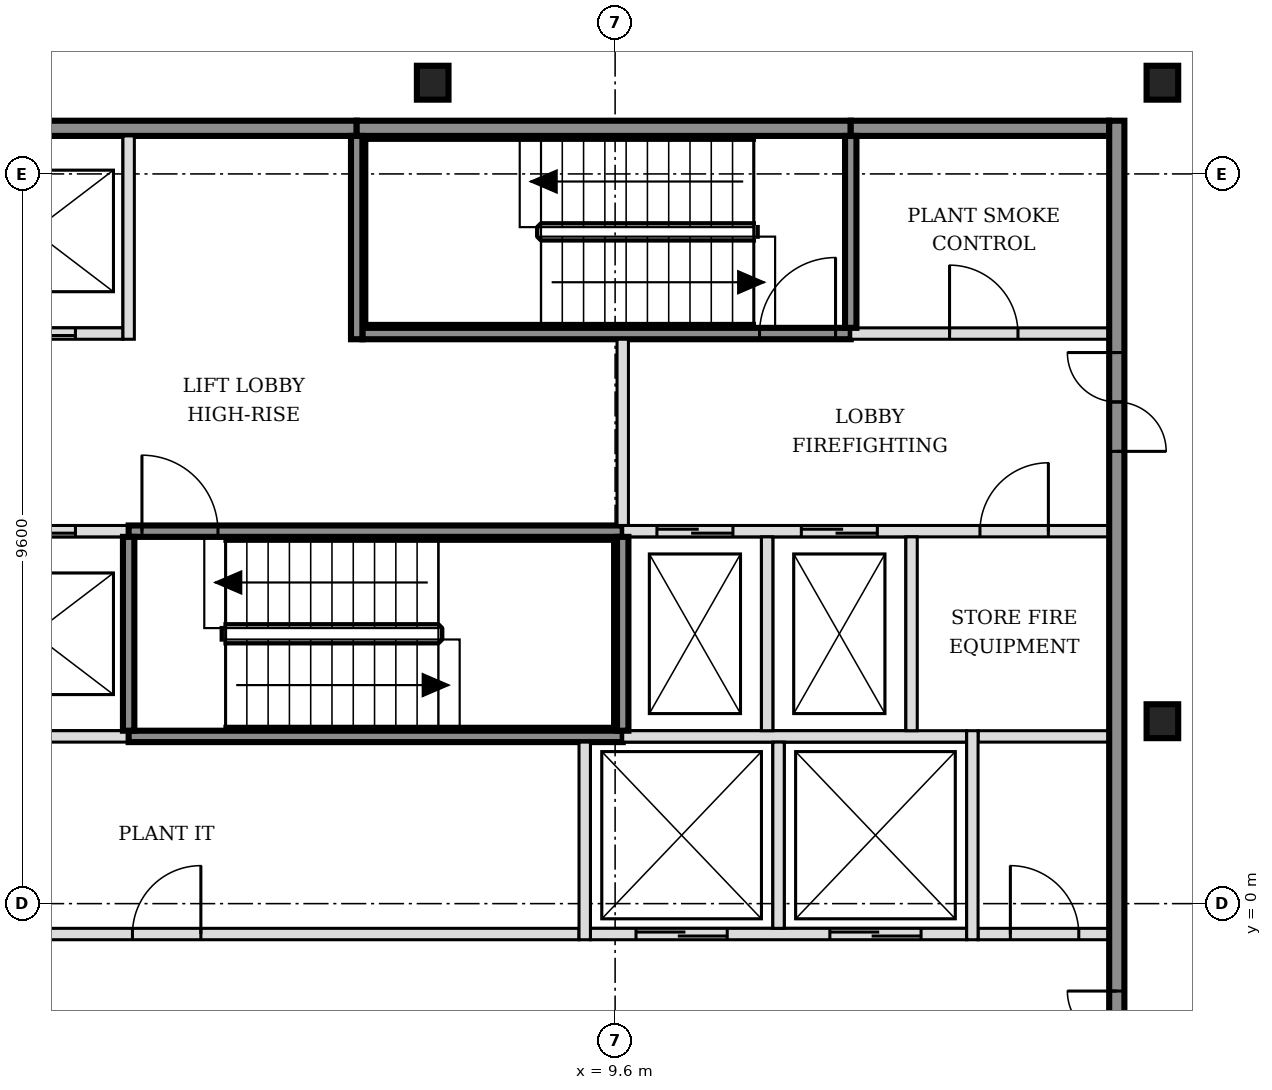
"""IFC4 building model, lengths in metres.
Left out: names, types, materials, properties, quantities, classifications, styles, units other than length and angle.
Written with IfcOpenShell. Run it as: python <this file> out.ifc"""

import sys

from ifc_helpers import new_model, si_unit, direction, frame, frame_2d, origin, origin_2d, place, context, subcontext, project, spatial, rectangle, i_section, extrude, element, fill, save


model = new_model("IFC4")
c1 = context("Model", 3, precision=1e-05, world=origin(), true_north=direction((0.0, 1.0)))
c2 = subcontext(c1, "Body", "Model", "MODEL_VIEW")
j1 = project(units=[si_unit("LENGTHUNIT", "METRE"), si_unit("PLANEANGLEUNIT", "RADIAN")], contexts=[c1])
p1 = place(None, origin())
s1 = spatial("IfcSite", under=j1, at=p1, CompositionType="ELEMENT")
p2 = place(p1, origin())
s2 = spatial("IfcBuilding", under=s1, at=p2, CompositionType="ELEMENT")
p3 = place(p2, frame((0.0, 0.0, 172.2)))
s3 = spatial("IfcBuildingStorey", under=s2, at=p3, CompositionType="ELEMENT", Elevation=172.2)
for number, where, z_axis, x_axis in (
    (1, (16.8, 2.4, -0.15), (0.0, 0.0, 1.0), (1.0, 0.0, 0.0)),
    (2, (7.2, 10.8, -0.15), (0.0, 0.0, 1.0), (1.0, 0.0, 0.0)),
    (3, (16.8, 10.8, -0.15), (0.0, 0.0, 1.0), (1.0, 0.0, 0.0)),
):
    element("IfcColumn", number, at=place(p3, frame(where, z_axis=z_axis, x_axis=x_axis)), inside=s3, PredefinedType="COLUMN", context=c2, shape_type="SweptSolid", body=[
        extrude(i_section(OverallWidth=0.416, OverallDepth=0.446, WebThickness=0.039, FlangeThickness=0.063, FilletRadius=0.015, at=origin_2d()), origin(), (0.0, 0.0, 1.0), 3.6),
    ])
p4 = place(p3, frame((-1.7, -0.4, 0.0), z_axis=(0.0, 0.0, 1.0), x_axis=(1.0, 0.0, 0.0)))
e4 = element("IfcWall", 4, at=p4, inside=s3, PredefinedType="PARTITIONING", context=c2, shape_type="SweptSolid", body=[
    extrude(rectangle(XDim=10.825, YDim=0.15, at=frame_2d((5.413, 0.0))), origin(), (0.0, 0.0, 1.0), 3.45),
])
p5 = place(p4, frame((4.95, 0.0, 0.0)))
e5 = element("IfcOpeningElement", 5, at=p5, cuts=e4, PredefinedType="OPENING", context=c2, shape_type="SweptSolid", body=[
    extrude(rectangle(XDim=0.9, YDim=2.1, at=frame_2d((0.45, 1.05))), frame((0.0, 0.085, 0.0), z_axis=(0.0, -1.0, 0.0), x_axis=(1.0, 0.0, 0.0)), (0.0, 0.0, 1.0), 0.17),
])
p6 = place(p3, frame((9.275, -0.4, 0.0), z_axis=(0.0, 0.0, 1.0), x_axis=(1.0, 0.0, 0.0)))
e6 = element("IfcWall", 6, at=p6, inside=s3, PredefinedType="SOLIDWALL", context=c2, shape_type="SweptSolid", body=[
    extrude(rectangle(XDim=4.95, YDim=0.15, at=frame_2d((2.475, 0.0))), origin(), (0.0, 0.0, 1.0), 3.45),
])
p7 = place(p6, frame((0.6, 0.0, 0.0)))
e7 = element("IfcOpeningElement", 7, at=p7, cuts=e6, PredefinedType="OPENING", context=c2, shape_type="SweptSolid", body=[
    extrude(rectangle(XDim=1.2, YDim=2.1, at=frame_2d((0.6, 1.05))), frame((0.0, 0.085, 0.0), z_axis=(0.0, -1.0, 0.0), x_axis=(1.0, 0.0, 0.0)), (0.0, 0.0, 1.0), 0.17),
])
p8 = place(p6, frame((3.15, 0.0, 0.0)))
e8 = element("IfcOpeningElement", 8, at=p8, cuts=e6, PredefinedType="OPENING", context=c2, shape_type="SweptSolid", body=[
    extrude(rectangle(XDim=1.2, YDim=2.1, at=frame_2d((0.6, 1.05))), frame((0.0, 0.085, 0.0), z_axis=(0.0, -1.0, 0.0), x_axis=(1.0, 0.0, 0.0)), (0.0, 0.0, 1.0), 0.17),
])
p9 = place(p3, frame((14.375, -0.4, 0.0), z_axis=(0.0, 0.0, 1.0), x_axis=(1.0, 0.0, 0.0)))
e9 = element("IfcWall", 9, at=p9, inside=s3, PredefinedType="PARTITIONING", context=c2, shape_type="SweptSolid", body=[
    extrude(rectangle(XDim=1.725, YDim=0.15, at=frame_2d((0.863, 0.0))), origin(), (0.0, 0.0, 1.0), 3.45),
])
p10 = place(p9, frame((0.425, 0.0, 0.0)))
e10 = element("IfcOpeningElement", 10, at=p10, cuts=e9, PredefinedType="OPENING", context=c2, shape_type="SweptSolid", body=[
    extrude(rectangle(XDim=0.9, YDim=2.1, at=frame_2d((0.45, 1.05))), frame((0.0, 0.085, 0.0), z_axis=(0.0, -1.0, 0.0), x_axis=(1.0, 0.0, 0.0)), (0.0, 0.0, 1.0), 0.17),
])
p11 = place(p3, frame((-1.7, 2.2, 0.0), z_axis=(0.0, 0.0, 1.0), x_axis=(1.0, 0.0, 0.0)))
e11 = element("IfcWall", 11, at=p11, inside=s3, PredefinedType="SOLIDWALL", context=c2, shape_type="SweptSolid", body=[
    extrude(rectangle(XDim=4.9, YDim=0.15, at=frame_2d((2.45, 0.0))), origin(), (0.0, 0.0, 1.0), 3.45),
])
p12 = place(p3, frame((3.2, 2.2, 0.0), z_axis=(0.0, 0.0, 1.0), x_axis=(1.0, 0.0, 0.0)))
e12 = element("IfcWall", 12, at=p12, inside=s3, PredefinedType="SOLIDWALL", context=c2, shape_type="SweptSolid", body=[
    extrude(rectangle(XDim=6.5, YDim=0.15, at=frame_2d((3.25, 0.0))), origin(), (0.0, 0.0, 1.0), 3.45),
])
p13 = place(p3, frame((9.7, 2.2, 0.0), z_axis=(0.0, 0.0, 1.0), x_axis=(1.0, 0.0, 0.0)))
e13 = element("IfcWall", 13, at=p13, inside=s3, PredefinedType="SOLIDWALL", context=c2, shape_type="SweptSolid", body=[
    extrude(rectangle(XDim=4.525, YDim=0.15, at=frame_2d((2.263, 0.0))), origin(), (0.0, 0.0, 1.0), 3.45),
])
p14 = place(p3, frame((14.375, 2.2, 0.0), z_axis=(0.0, 0.0, 1.0), x_axis=(1.0, 0.0, 0.0)))
e14 = element("IfcWall", 14, at=p14, inside=s3, PredefinedType="PARTITIONING", context=c2, shape_type="SweptSolid", body=[
    extrude(rectangle(XDim=1.725, YDim=0.15, at=frame_2d((0.863, 0.0))), origin(), (0.0, 0.0, 1.0), 3.45),
])
p15 = place(p3, frame((-1.7, 4.9, 0.0), z_axis=(0.0, 0.0, 1.0), x_axis=(1.0, 0.0, 0.0)))
e15 = element("IfcWall", 15, at=p15, inside=s3, PredefinedType="SOLIDWALL", context=c2, shape_type="SweptSolid", body=[
    extrude(rectangle(XDim=4.9, YDim=0.15, at=frame_2d((2.45, 0.0))), origin(), (0.0, 0.0, 1.0), 3.45),
])
p16 = place(p15, frame((0.6, 0.0, 0.0)))
e16 = element("IfcOpeningElement", 16, at=p16, cuts=e15, PredefinedType="OPENING", context=c2, shape_type="SweptSolid", body=[
    extrude(rectangle(XDim=1.1, YDim=2.1, at=frame_2d((0.55, 1.05))), frame((0.0, 0.085, 0.0), z_axis=(0.0, -1.0, 0.0), x_axis=(1.0, 0.0, 0.0)), (0.0, 0.0, 1.0), 0.17),
])
p17 = place(p15, frame((3.1, 0.0, 0.0)))
e17 = element("IfcOpeningElement", 17, at=p17, cuts=e15, PredefinedType="OPENING", context=c2, shape_type="SweptSolid", body=[
    extrude(rectangle(XDim=1.1, YDim=2.1, at=frame_2d((0.55, 1.05))), frame((0.0, 0.085, 0.0), z_axis=(0.0, -1.0, 0.0), x_axis=(1.0, 0.0, 0.0)), (0.0, 0.0, 1.0), 0.17),
])
p18 = place(p3, frame((3.2, 4.9, 0.0), z_axis=(0.0, 0.0, 1.0), x_axis=(1.0, 0.0, 0.0)))
e18 = element("IfcWall", 18, at=p18, inside=s3, PredefinedType="SOLIDWALL", context=c2, shape_type="SweptSolid", body=[
    extrude(rectangle(XDim=6.5, YDim=0.15, at=frame_2d((3.25, 0.0))), origin(), (0.0, 0.0, 1.0), 3.45),
])
p19 = place(p18, frame((0.175, 0.0, 0.0)))
e19 = element("IfcOpeningElement", 19, at=p19, cuts=e18, PredefinedType="OPENING", context=c2, shape_type="SweptSolid", body=[
    extrude(rectangle(XDim=1.0, YDim=2.1, at=frame_2d((0.5, 1.05))), frame((0.0, 0.085, 0.0), z_axis=(0.0, -1.0, 0.0), x_axis=(1.0, 0.0, 0.0)), (0.0, 0.0, 1.0), 0.17),
])
p20 = place(p3, frame((9.7, 4.9, 0.0), z_axis=(0.0, 0.0, 1.0), x_axis=(1.0, 0.0, 0.0)))
e20 = element("IfcWall", 20, at=p20, inside=s3, PredefinedType="SOLIDWALL", context=c2, shape_type="SweptSolid", body=[
    extrude(rectangle(XDim=6.4, YDim=0.15, at=frame_2d((3.2, 0.0))), origin(), (0.0, 0.0, 1.0), 3.45),
])
p21 = place(p20, frame((0.45, 0.0, 0.0)))
e21 = element("IfcOpeningElement", 21, at=p21, cuts=e20, PredefinedType="OPENING", context=c2, shape_type="SweptSolid", body=[
    extrude(rectangle(XDim=1.0, YDim=2.1, at=frame_2d((0.5, 1.05))), frame((0.0, 0.085, 0.0), z_axis=(0.0, -1.0, 0.0), x_axis=(1.0, 0.0, 0.0)), (0.0, 0.0, 1.0), 0.17),
])
p22 = place(p20, frame((2.35, 0.0, 0.0)))
e22 = element("IfcOpeningElement", 22, at=p22, cuts=e20, PredefinedType="OPENING", context=c2, shape_type="SweptSolid", body=[
    extrude(rectangle(XDim=1.0, YDim=2.1, at=frame_2d((0.5, 1.05))), frame((0.0, 0.085, 0.0), z_axis=(0.0, -1.0, 0.0), x_axis=(1.0, 0.0, 0.0)), (0.0, 0.0, 1.0), 0.17),
])
p23 = place(p20, frame((4.7, 0.0, 0.0)))
e23 = element("IfcOpeningElement", 23, at=p23, cuts=e20, PredefinedType="OPENING", context=c2, shape_type="SweptSolid", body=[
    extrude(rectangle(XDim=0.9, YDim=2.1, at=frame_2d((0.45, 1.05))), frame((0.0, 0.085, 0.0), z_axis=(0.0, -1.0, 0.0), x_axis=(1.0, 0.0, 0.0)), (0.0, 0.0, 1.0), 0.17),
])
p24 = place(p3, frame((-1.7, 7.5, 0.0), z_axis=(0.0, 0.0, 1.0), x_axis=(1.0, 0.0, 0.0)))
e24 = element("IfcWall", 24, at=p24, inside=s3, PredefinedType="SOLIDWALL", context=c2, shape_type="SweptSolid", body=[
    extrude(rectangle(XDim=4.825, YDim=0.15, at=frame_2d((2.413, 0.0))), origin(), (0.0, 0.0, 1.0), 3.45),
])
p25 = place(p24, frame((0.6, 0.0, 0.0)))
e25 = element("IfcOpeningElement", 25, at=p25, cuts=e24, PredefinedType="OPENING", context=c2, shape_type="SweptSolid", body=[
    extrude(rectangle(XDim=1.1, YDim=2.1, at=frame_2d((0.55, 1.05))), frame((0.0, 0.085, 0.0), z_axis=(0.0, -1.0, 0.0), x_axis=(1.0, 0.0, 0.0)), (0.0, 0.0, 1.0), 0.17),
])
p26 = place(p24, frame((3.1, 0.0, 0.0)))
e26 = element("IfcOpeningElement", 26, at=p26, cuts=e24, PredefinedType="OPENING", context=c2, shape_type="SweptSolid", body=[
    extrude(rectangle(XDim=1.1, YDim=2.1, at=frame_2d((0.55, 1.05))), frame((0.0, 0.085, 0.0), z_axis=(0.0, -1.0, 0.0), x_axis=(1.0, 0.0, 0.0)), (0.0, 0.0, 1.0), 0.17),
])
p27 = place(p3, frame((6.275, 7.5, 0.0), z_axis=(0.0, 0.0, 1.0), x_axis=(1.0, 0.0, 0.0)))
e27 = element("IfcWall", 27, at=p27, inside=s3, PredefinedType="SOLIDWALL", context=c2, shape_type="SweptSolid", body=[
    extrude(rectangle(XDim=6.425, YDim=0.15, at=frame_2d((3.212, 0.0))), origin(), (0.0, 0.0, 1.0), 3.45),
])
p28 = place(p27, frame((5.225, 0.0, 0.0)))
e28 = element("IfcOpeningElement", 28, at=p28, cuts=e27, PredefinedType="OPENING", context=c2, shape_type="SweptSolid", body=[
    extrude(rectangle(XDim=1.0, YDim=2.1, at=frame_2d((0.5, 1.05))), frame((0.0, 0.085, 0.0), z_axis=(0.0, -1.0, 0.0), x_axis=(1.0, 0.0, 0.0)), (0.0, 0.0, 1.0), 0.17),
])
p29 = place(p3, frame((12.7, 7.5, 0.0), z_axis=(0.0, 0.0, 1.0), x_axis=(1.0, 0.0, 0.0)))
e29 = element("IfcWall", 29, at=p29, inside=s3, PredefinedType="SOLIDWALL", context=c2, shape_type="SweptSolid", body=[
    extrude(rectangle(XDim=3.4, YDim=0.15, at=frame_2d((1.7, 0.0))), origin(), (0.0, 0.0, 1.0), 3.45),
])
p30 = place(p29, frame((1.3, 0.0, 0.0)))
e30 = element("IfcOpeningElement", 30, at=p30, cuts=e29, PredefinedType="OPENING", context=c2, shape_type="SweptSolid", body=[
    extrude(rectangle(XDim=0.9, YDim=2.1, at=frame_2d((0.45, 1.05))), frame((0.0, 0.085, 0.0), z_axis=(0.0, -1.0, 0.0), x_axis=(1.0, 0.0, 0.0)), (0.0, 0.0, 1.0), 0.17),
])
p31 = place(p3, frame((-1.7, 10.2, 0.0), z_axis=(0.0, 0.0, 1.0), x_axis=(1.0, 0.0, 0.0)))
e31 = element("IfcWall", 31, at=p31, inside=s3, PredefinedType="SOLIDWALL", context=c2, shape_type="SweptSolid", body=[
    extrude(rectangle(XDim=7.9, YDim=0.2, at=frame_2d((3.95, 0.0))), origin(), (0.0, 0.0, 1.0), 3.45),
])
p32 = place(p3, frame((6.2, 10.2, 0.0), z_axis=(0.0, 0.0, 1.0), x_axis=(1.0, 0.0, 0.0)))
e32 = element("IfcWall", 32, at=p32, inside=s3, PredefinedType="SOLIDWALL", context=c2, shape_type="SweptSolid", body=[
    extrude(rectangle(XDim=6.5, YDim=0.2, at=frame_2d((3.25, 0.0))), origin(), (0.0, 0.0, 1.0), 3.45),
])
p33 = place(p3, frame((12.7, 10.2, 0.0), z_axis=(0.0, 0.0, 1.0), x_axis=(1.0, 0.0, 0.0)))
e33 = element("IfcWall", 33, at=p33, inside=s3, PredefinedType="SOLIDWALL", context=c2, shape_type="SweptSolid", body=[
    extrude(rectangle(XDim=3.4, YDim=0.2, at=frame_2d((1.7, 0.0))), origin(), (0.0, 0.0, 1.0), 3.45),
])
p34 = place(p3, frame((3.2, 2.275, 0.0), z_axis=(0.0, 0.0, 1.0), x_axis=(0.0, 1.0, 0.0)))
e34 = element("IfcWall", 34, at=p34, inside=s3, PredefinedType="SOLIDWALL", context=c2, shape_type="SweptSolid", body=[
    extrude(rectangle(XDim=2.55, YDim=0.15, at=frame_2d((1.275, 0.0))), origin(), (0.0, 0.0, 1.0), 3.45),
])
for number, where, z_axis, x_axis in (
    (35, (3.2, 7.425, 0.0), (0.0, 0.0, 1.0), (0.0, 1.0, 0.0)),
    (36, (6.2, 7.425, 0.0), (0.0, 0.0, 1.0), (0.0, 1.0, 0.0)),
):
    element("IfcWall", number, at=place(p3, frame(where, z_axis=z_axis, x_axis=x_axis)), inside=s3, PredefinedType="SOLIDWALL", context=c2, shape_type="SweptSolid", body=[
        extrude(rectangle(XDim=2.675, YDim=0.15, at=frame_2d((1.337, 0.0))), origin(), (0.0, 0.0, 1.0), 3.45),
    ])
p35 = place(p3, frame((9.2, -0.475, 0.0), z_axis=(0.0, 0.0, 1.0), x_axis=(0.0, 1.0, 0.0)))
e37 = element("IfcWall", 37, at=p35, inside=s3, PredefinedType="SOLIDWALL", context=c2, shape_type="SweptSolid", body=[
    extrude(rectangle(XDim=2.6, YDim=0.15, at=frame_2d((1.3, 0.0))), origin(), (0.0, 0.0, 1.0), 3.45),
])
p36 = place(p3, frame((9.7, 2.275, 0.0), z_axis=(0.0, 0.0, 1.0), x_axis=(0.0, 1.0, 0.0)))
e38 = element("IfcWall", 38, at=p36, inside=s3, PredefinedType="SOLIDWALL", context=c2, shape_type="SweptSolid", body=[
    extrude(rectangle(XDim=2.55, YDim=0.15, at=frame_2d((1.275, 0.0))), origin(), (0.0, 0.0, 1.0), 3.45),
])
p37 = place(p3, frame((9.7, 4.975, 0.0), z_axis=(0.0, 0.0, 1.0), x_axis=(0.0, 1.0, 0.0)))
e39 = element("IfcWall", 39, at=p37, inside=s3, PredefinedType="SOLIDWALL", context=c2, shape_type="SweptSolid", body=[
    extrude(rectangle(XDim=2.45, YDim=0.15, at=frame_2d((1.225, 0.0))), origin(), (0.0, 0.0, 1.0), 3.45),
])
p38 = place(p3, frame((11.6, 2.275, 0.0), z_axis=(0.0, 0.0, 1.0), x_axis=(0.0, 1.0, 0.0)))
e40 = element("IfcWall", 40, at=p38, inside=s3, PredefinedType="SOLIDWALL", context=c2, shape_type="SweptSolid", body=[
    extrude(rectangle(XDim=2.55, YDim=0.15, at=frame_2d((1.275, 0.0))), origin(), (0.0, 0.0, 1.0), 3.45),
])
p39 = place(p3, frame((11.75, -0.325, 0.0), z_axis=(0.0, 0.0, 1.0), x_axis=(0.0, 1.0, 0.0)))
e41 = element("IfcWall", 41, at=p39, inside=s3, PredefinedType="SOLIDWALL", context=c2, shape_type="SweptSolid", body=[
    extrude(rectangle(XDim=2.45, YDim=0.15, at=frame_2d((1.225, 0.0))), origin(), (0.0, 0.0, 1.0), 3.45),
])
p40 = place(p3, frame((12.7, 7.575, 0.0), z_axis=(0.0, 0.0, 1.0), x_axis=(0.0, 1.0, 0.0)))
e42 = element("IfcWall", 42, at=p40, inside=s3, PredefinedType="SOLIDWALL", context=c2, shape_type="SweptSolid", body=[
    extrude(rectangle(XDim=2.525, YDim=0.15, at=frame_2d((1.263, 0.0))), origin(), (0.0, 0.0, 1.0), 3.45),
])
p41 = place(p3, frame((13.5, 2.275, 0.0), z_axis=(0.0, 0.0, 1.0), x_axis=(0.0, 1.0, 0.0)))
e43 = element("IfcWall", 43, at=p41, inside=s3, PredefinedType="SOLIDWALL", context=c2, shape_type="SweptSolid", body=[
    extrude(rectangle(XDim=2.55, YDim=0.15, at=frame_2d((1.275, 0.0))), origin(), (0.0, 0.0, 1.0), 3.45),
])
p42 = place(p3, frame((14.3, -0.475, 0.0), z_axis=(0.0, 0.0, 1.0), x_axis=(0.0, 1.0, 0.0)))
e44 = element("IfcWall", 44, at=p42, inside=s3, PredefinedType="SOLIDWALL", context=c2, shape_type="SweptSolid", body=[
    extrude(rectangle(XDim=2.75, YDim=0.15, at=frame_2d((1.375, 0.0))), origin(), (0.0, 0.0, 1.0), 3.45),
])
p43 = place(p3, frame((16.2, -5.5, 0.0), z_axis=(0.0, 0.0, 1.0), x_axis=(0.0, 1.0, 0.0)))
e45 = element("IfcWall", 45, at=p43, inside=s3, PredefinedType="SOLIDWALL", context=c2, shape_type="SweptSolid", body=[
    extrude(rectangle(XDim=15.8, YDim=0.2, at=frame_2d((7.9, 0.0))), origin(), (0.0, 0.0, 1.0), 3.45),
])
p44 = place(p43, frame((3.05, 0.0, 0.0)))
e46 = element("IfcOpeningElement", 46, at=p44, cuts=e45, PredefinedType="OPENING", context=c2, shape_type="SweptSolid", body=[
    extrude(rectangle(XDim=1.3, YDim=2.1, at=frame_2d((0.65, 1.05))), frame((0.0, 0.11, 0.0), z_axis=(0.0, -1.0, 0.0), x_axis=(1.0, 0.0, 0.0)), (0.0, 0.0, 1.0), 0.22),
])
p45 = place(p43, frame((11.45, 0.0, 0.0)))
e47 = element("IfcOpeningElement", 47, at=p45, cuts=e45, PredefinedType="OPENING", context=c2, shape_type="SweptSolid", body=[
    extrude(rectangle(XDim=1.3, YDim=2.1, at=frame_2d((0.65, 1.05))), frame((0.0, 0.11, 0.0), z_axis=(0.0, -1.0, 0.0), x_axis=(1.0, 0.0, 0.0)), (0.0, 0.0, 1.0), 0.22),
])
p46 = place(p7, origin())
e48 = element("IfcDoor", 48, at=p46, inside=s3, OperationType="DOUBLE_DOOR_SLIDING", PredefinedType="DOOR", context=c2, shape_type="SweptSolid", body=[
    extrude(rectangle(XDim=1.2, YDim=2.1, at=frame_2d((0.6, 1.05))), frame((0.0, 0.025, 0.0), z_axis=(0.0, -1.0, 0.0), x_axis=(1.0, 0.0, 0.0)), (0.0, 0.0, 1.0), 0.05),
])
fill(e7, e48)
p47 = place(p8, origin())
e49 = element("IfcDoor", 49, at=p47, inside=s3, OperationType="DOUBLE_DOOR_SLIDING", PredefinedType="DOOR", context=c2, shape_type="SweptSolid", body=[
    extrude(rectangle(XDim=1.2, YDim=2.1, at=frame_2d((0.6, 1.05))), frame((0.0, 0.025, 0.0), z_axis=(0.0, -1.0, 0.0), x_axis=(1.0, 0.0, 0.0)), (0.0, 0.0, 1.0), 0.05),
])
fill(e8, e49)
p48 = place(p17, origin())
e50 = element("IfcDoor", 50, at=p48, inside=s3, OperationType="DOUBLE_DOOR_SLIDING", PredefinedType="DOOR", context=c2, shape_type="SweptSolid", body=[
    extrude(rectangle(XDim=1.1, YDim=2.1, at=frame_2d((0.55, 1.05))), frame((0.0, 0.025, 0.0), z_axis=(0.0, -1.0, 0.0), x_axis=(1.0, 0.0, 0.0)), (0.0, 0.0, 1.0), 0.05),
])
fill(e17, e50)
p49 = place(p26, origin())
e51 = element("IfcDoor", 51, at=p49, inside=s3, OperationType="DOUBLE_DOOR_SLIDING", PredefinedType="DOOR", context=c2, shape_type="SweptSolid", body=[
    extrude(rectangle(XDim=1.1, YDim=2.1, at=frame_2d((0.55, 1.05))), frame((0.0, 0.025, 0.0), z_axis=(0.0, -1.0, 0.0), x_axis=(1.0, 0.0, 0.0)), (0.0, 0.0, 1.0), 0.05),
])
fill(e26, e51)
p50 = place(p21, origin())
e52 = element("IfcDoor", 52, at=p50, inside=s3, OperationType="DOUBLE_DOOR_SLIDING", PredefinedType="DOOR", context=c2, shape_type="SweptSolid", body=[
    extrude(rectangle(XDim=1.0, YDim=2.1, at=frame_2d((0.5, 1.05))), frame((0.0, 0.025, 0.0), z_axis=(0.0, -1.0, 0.0), x_axis=(1.0, 0.0, 0.0)), (0.0, 0.0, 1.0), 0.05),
])
fill(e21, e52)
p51 = place(p22, origin())
e53 = element("IfcDoor", 53, at=p51, inside=s3, OperationType="DOUBLE_DOOR_SLIDING", PredefinedType="DOOR", context=c2, shape_type="SweptSolid", body=[
    extrude(rectangle(XDim=1.0, YDim=2.1, at=frame_2d((0.5, 1.05))), frame((0.0, 0.025, 0.0), z_axis=(0.0, -1.0, 0.0), x_axis=(1.0, 0.0, 0.0)), (0.0, 0.0, 1.0), 0.05),
])
fill(e22, e53)
p52 = place(p19, origin())
e54 = element("IfcDoor", 54, at=p52, inside=s3, OperationType="SINGLE_SWING_LEFT", PredefinedType="DOOR", context=c2, shape_type="SweptSolid", body=[
    extrude(rectangle(XDim=1.0, YDim=2.1, at=frame_2d((0.5, 1.05))), frame((0.0, 0.025, 0.0), z_axis=(0.0, -1.0, 0.0), x_axis=(1.0, 0.0, 0.0)), (0.0, 0.0, 1.0), 0.05),
])
fill(e19, e54)
p53 = place(p28, origin())
e55 = element("IfcDoor", 55, at=p53, inside=s3, OperationType="SINGLE_SWING_RIGHT", PredefinedType="DOOR", context=c2, shape_type="SweptSolid", body=[
    extrude(rectangle(XDim=1.0, YDim=2.1, at=frame_2d((0.5, 1.05))), frame((0.0, 0.025, 0.0), z_axis=(0.0, -1.0, 0.0), x_axis=(1.0, 0.0, 0.0)), (0.0, 0.0, 1.0), 0.05),
])
fill(e28, e55)
p54 = place(p44, origin())
e56 = element("IfcDoor", 56, at=p54, inside=s3, OperationType="DOUBLE_DOOR_SINGLE_SWING", PredefinedType="DOOR", context=c2, shape_type="SweptSolid", body=[
    extrude(rectangle(XDim=1.3, YDim=2.1, at=frame_2d((0.65, 1.05))), frame((0.0, 0.025, 0.0), z_axis=(0.0, -1.0, 0.0), x_axis=(1.0, 0.0, 0.0)), (0.0, 0.0, 1.0), 0.05),
])
fill(e46, e56)
p55 = place(p45, origin())
e57 = element("IfcDoor", 57, at=p55, inside=s3, OperationType="DOUBLE_DOOR_SINGLE_SWING", PredefinedType="DOOR", context=c2, shape_type="SweptSolid", body=[
    extrude(rectangle(XDim=1.3, YDim=2.1, at=frame_2d((0.65, 1.05))), frame((0.0, 0.025, 0.0), z_axis=(0.0, -1.0, 0.0), x_axis=(1.0, 0.0, 0.0)), (0.0, 0.0, 1.0), 0.05),
])
fill(e47, e57)
p56 = place(p10, origin())
e58 = element("IfcDoor", 58, at=p56, inside=s3, OperationType="SINGLE_SWING_LEFT", PredefinedType="DOOR", context=c2, shape_type="SweptSolid", body=[
    extrude(rectangle(XDim=0.9, YDim=2.1, at=frame_2d((0.45, 1.05))), frame((0.0, 0.025, 0.0), z_axis=(0.0, -1.0, 0.0), x_axis=(1.0, 0.0, 0.0)), (0.0, 0.0, 1.0), 0.05),
])
fill(e10, e58)
p57 = place(p23, origin())
e59 = element("IfcDoor", 59, at=p57, inside=s3, OperationType="SINGLE_SWING_RIGHT", PredefinedType="DOOR", context=c2, shape_type="SweptSolid", body=[
    extrude(rectangle(XDim=0.9, YDim=2.1, at=frame_2d((0.45, 1.05))), frame((0.0, 0.025, 0.0), z_axis=(0.0, -1.0, 0.0), x_axis=(1.0, 0.0, 0.0)), (0.0, 0.0, 1.0), 0.05),
])
fill(e23, e59)
p58 = place(p30, origin())
e60 = element("IfcDoor", 60, at=p58, inside=s3, OperationType="SINGLE_SWING_LEFT", PredefinedType="DOOR", context=c2, shape_type="SweptSolid", body=[
    extrude(rectangle(XDim=0.9, YDim=2.1, at=frame_2d((0.45, 1.05))), frame((0.0, 0.025, 0.0), z_axis=(0.0, -1.0, 0.0), x_axis=(1.0, 0.0, 0.0)), (0.0, 0.0, 1.0), 0.05),
])
fill(e30, e60)
p59 = place(p5, origin())
e61 = element("IfcDoor", 61, at=p59, inside=s3, OperationType="SINGLE_SWING_RIGHT", PredefinedType="DOOR", context=c2, shape_type="SweptSolid", body=[
    extrude(rectangle(XDim=0.9, YDim=2.1, at=frame_2d((0.45, 1.05))), frame((0.0, 0.025, 0.0), z_axis=(0.0, -1.0, 0.0), x_axis=(1.0, 0.0, 0.0)), (0.0, 0.0, 1.0), 0.05),
])
fill(e5, e61)
save(model, sys.argv[1])
